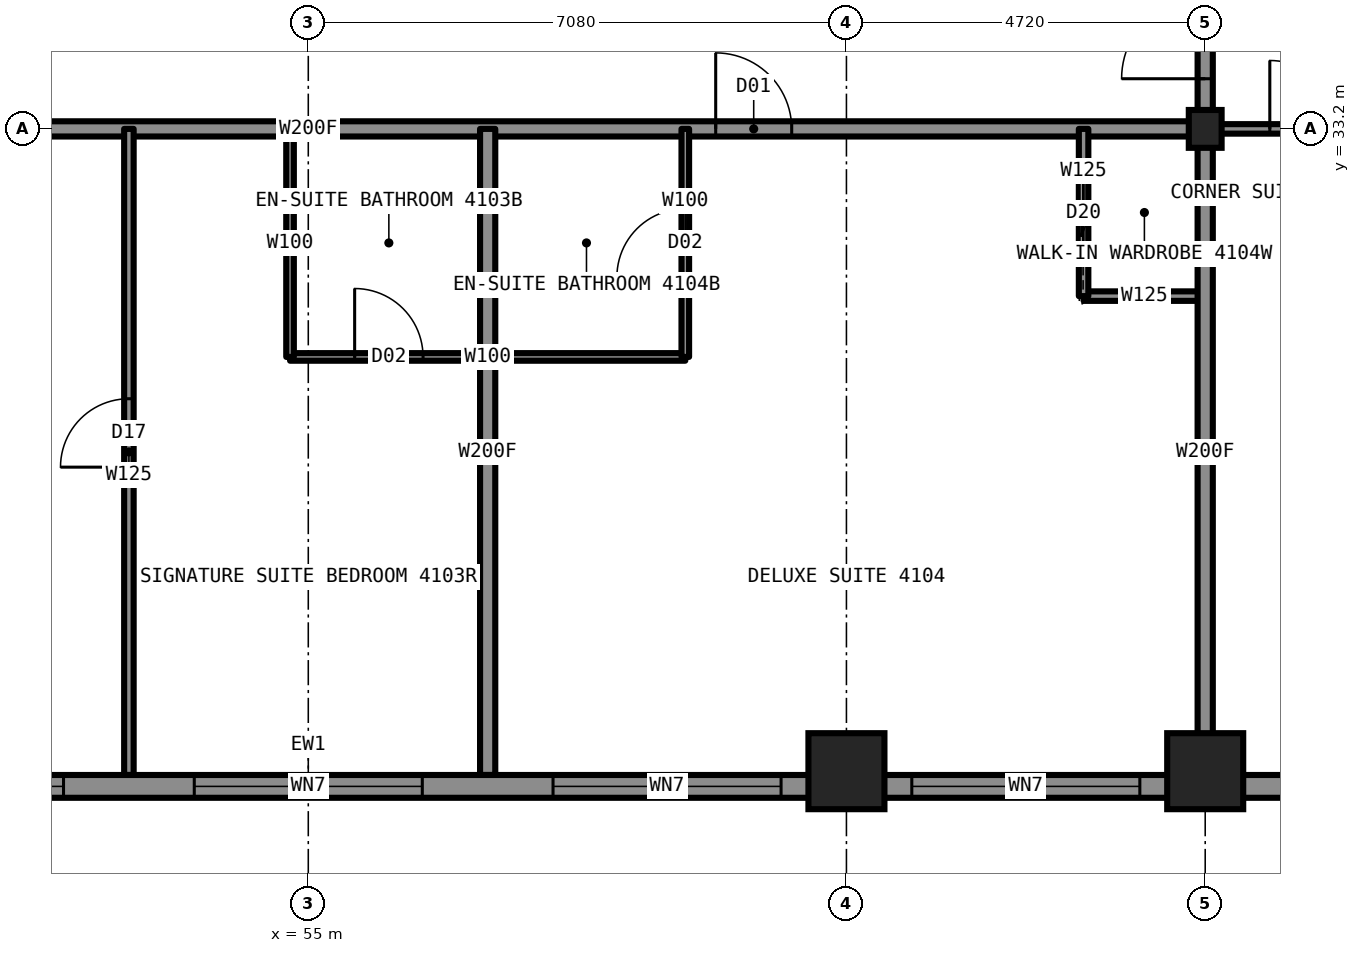
"""IFC4 building model, lengths in metres.
Left out: names, types, materials, properties, quantities, classifications, styles, units other than length and angle.
Written with IfcOpenShell. Run it as: python <this file> out.ifc"""

import sys

from ifc_helpers import new_model, si_unit, direction, frame, frame_2d, origin, origin_2d, place, context, subcontext, project, spatial, rectangle, i_section, extrude, element, fill, save


model = new_model("IFC4")
c1 = context("Model", 3, precision=1e-05, world=origin(), true_north=direction((0.0, 1.0)))
c2 = subcontext(c1, "Body", "Model", "MODEL_VIEW")
j1 = project(units=[si_unit("LENGTHUNIT", "METRE"), si_unit("PLANEANGLEUNIT", "RADIAN")], contexts=[c1])
p1 = place(None, origin())
s1 = spatial("IfcSite", under=j1, at=p1, CompositionType="ELEMENT")
p2 = place(p1, origin())
s2 = spatial("IfcBuilding", under=s1, at=p2, CompositionType="ELEMENT")
p3 = place(p2, frame((0.0, 0.0, 145.9)))
s3 = spatial("IfcBuildingStorey", under=s2, at=p3, CompositionType="ELEMENT", Elevation=145.9)
for number, where, z_axis, x_axis in (
    (1, (62.08, 24.75, 0.0), (0.0, 0.0, 1.0), (1.0, 0.0, 0.0)),
    (2, (66.8, 24.75, 0.0), (0.0, 0.0, 1.0), (1.0, 0.0, 0.0)),
):
    element("IfcColumn", number, at=place(p3, frame(where, z_axis=z_axis, x_axis=x_axis)), inside=s3, PredefinedType="COLUMN", context=c2, shape_type="SweptSolid", body=[
        extrude(i_section(OverallWidth=0.422, OverallDepth=0.465, WebThickness=0.045, FlangeThickness=0.073, at=origin_2d()), origin(), (0.0, 0.0, 1.0), 3.5),
    ])
p4 = place(p3, frame((66.8, 33.2, 0.0), z_axis=(0.0, 0.0, 1.0), x_axis=(1.0, 0.0, 0.0)))
e3 = element("IfcColumn", 3, at=p4, inside=s3, PredefinedType="COLUMN", context=c2, shape_type="SweptSolid", body=[
    extrude(i_section(OverallWidth=0.432, OverallDepth=0.498, WebThickness=0.056, FlangeThickness=0.089, at=origin_2d()), origin(), (0.0, 0.0, 1.0), 3.5),
])
p5 = place(p3, frame((43.2, 33.2, 0.0), z_axis=(0.0, 0.0, 1.0), x_axis=(1.0, 0.0, 0.0)))
e4 = element("IfcWall", 4, at=p5, inside=s3, PredefinedType="PARTITIONING", context=c2, shape_type="SweptSolid", body=[
    extrude(rectangle(XDim=23.6, YDim=0.2, at=frame_2d((11.8, 0.0))), origin(), (0.0, 0.0, 1.0), 3.33),
])
p6 = place(p5, frame((1.85, 0.0, 0.0)))
e5 = element("IfcOpeningElement", 5, at=p6, cuts=e4, PredefinedType="OPENING", context=c2, shape_type="SweptSolid", body=[
    extrude(rectangle(XDim=1.1, YDim=2.2, at=frame_2d((0.55, 1.1))), frame((0.0, 0.11, 0.0), z_axis=(0.0, -1.0, 0.0), x_axis=(1.0, 0.0, 0.0)), (0.0, 0.0, 1.0), 0.22),
])
p7 = place(p5, frame((17.16, 0.0, 0.0)))
e6 = element("IfcOpeningElement", 6, at=p7, cuts=e4, PredefinedType="OPENING", context=c2, shape_type="SweptSolid", body=[
    extrude(rectangle(XDim=1.0, YDim=2.2, at=frame_2d((0.5, 1.1))), frame((0.0, 0.11, 0.0), z_axis=(0.0, -1.0, 0.0), x_axis=(1.0, 0.0, 0.0)), (0.0, 0.0, 1.0), 0.22),
])
p8 = place(p3, frame((66.8, 33.2, 0.0), z_axis=(0.0, 0.0, 1.0), x_axis=(1.0, 0.0, 0.0)))
e7 = element("IfcWall", 7, at=p8, inside=s3, PredefinedType="PARTITIONING", context=c2, shape_type="SweptSolid", body=[
    extrude(rectangle(XDim=8.5, YDim=0.125, at=frame_2d((4.25, 0.0))), origin(), (0.0, 0.0, 1.0), 2.573),
])
p9 = place(p8, frame((0.85, 0.0, 0.0)))
e8 = element("IfcOpeningElement", 8, at=p9, cuts=e7, PredefinedType="OPENING", context=c2, shape_type="SweptSolid", body=[
    extrude(rectangle(XDim=0.9, YDim=2.2, at=frame_2d((0.45, 1.1))), frame((0.0, 0.073, 0.0), z_axis=(0.0, -1.0, 0.0), x_axis=(1.0, 0.0, 0.0)), (0.0, 0.0, 1.0), 0.145),
])
p10 = place(p3, frame((65.2, 31.0, 0.0), z_axis=(0.0, 0.0, 1.0), x_axis=(1.0, 0.0, 0.0)))
e9 = element("IfcWall", 9, at=p10, inside=s3, PredefinedType="PARTITIONING", context=c2, shape_type="SweptSolid", body=[
    extrude(rectangle(XDim=1.6, YDim=0.125, at=frame_2d((0.8, 0.0))), origin(), (0.0, 0.0, 1.0), 3.33),
])
p11 = place(p3, frame((54.76, 30.2, 0.0), z_axis=(0.0, 0.0, 1.0), x_axis=(1.0, 0.0, 0.0)))
e10 = element("IfcWall", 10, at=p11, inside=s3, PredefinedType="PARTITIONING", context=c2, shape_type="SweptSolid", body=[
    extrude(rectangle(XDim=5.2, YDim=0.1, at=frame_2d((2.6, 0.0))), origin(), (0.0, 0.0, 1.0), 3.33),
])
p12 = place(p11, frame((0.85, 0.0, 0.0)))
e11 = element("IfcOpeningElement", 11, at=p12, cuts=e10, PredefinedType="OPENING", context=c2, shape_type="SweptSolid", body=[
    extrude(rectangle(XDim=0.9, YDim=2.1, at=frame_2d((0.45, 1.05))), frame((0.0, 0.06, 0.0), z_axis=(0.0, -1.0, 0.0), x_axis=(1.0, 0.0, 0.0)), (0.0, 0.0, 1.0), 0.12),
])
p13 = place(p3, frame((54.76, 30.2, 0.0), z_axis=(0.0, 0.0, 1.0), x_axis=(0.0, 1.0, 0.0)))
e12 = element("IfcWall", 12, at=p13, inside=s3, PredefinedType="PARTITIONING", context=c2, shape_type="SweptSolid", body=[
    extrude(rectangle(XDim=3.0, YDim=0.1, at=frame_2d((1.5, 0.0))), origin(), (0.0, 0.0, 1.0), 3.33),
])
p14 = place(p3, frame((52.64, 24.7, 0.0), z_axis=(0.0, 0.0, 1.0), x_axis=(0.0, 1.0, 0.0)))
e13 = element("IfcWall", 13, at=p14, inside=s3, PredefinedType="PARTITIONING", context=c2, shape_type="SweptSolid", body=[
    extrude(rectangle(XDim=8.5, YDim=0.125, at=frame_2d((4.25, 0.0))), origin(), (0.0, 0.0, 1.0), 3.33),
])
p15 = place(p14, frame((4.05, 0.0, 0.0)))
e14 = element("IfcOpeningElement", 14, at=p15, cuts=e13, PredefinedType="OPENING", context=c2, shape_type="SweptSolid", body=[
    extrude(rectangle(XDim=0.9, YDim=2.2, at=frame_2d((0.45, 1.1))), frame((0.0, 0.073, 0.0), z_axis=(0.0, -1.0, 0.0), x_axis=(1.0, 0.0, 0.0)), (0.0, 0.0, 1.0), 0.145),
])
p16 = place(p3, frame((65.2, 31.0, 0.0), z_axis=(0.0, 0.0, 1.0), x_axis=(0.0, 1.0, 0.0)))
e15 = element("IfcWall", 15, at=p16, inside=s3, PredefinedType="PARTITIONING", context=c2, shape_type="SweptSolid", body=[
    extrude(rectangle(XDim=2.2, YDim=0.125, at=frame_2d((1.1, 0.0))), origin(), (0.0, 0.0, 1.0), 3.33),
])
p17 = place(p16, frame((0.7, 0.0, 0.0)))
e16 = element("IfcOpeningElement", 16, at=p17, cuts=e15, PredefinedType="OPENING", context=c2, shape_type="SweptSolid", body=[
    extrude(rectangle(XDim=0.8, YDim=2.1, at=frame_2d((0.4, 1.05))), frame((0.0, 0.073, 0.0), z_axis=(0.0, -1.0, 0.0), x_axis=(1.0, 0.0, 0.0)), (0.0, 0.0, 1.0), 0.145),
])
p18 = place(p3, frame((66.8, 33.2, 0.0), z_axis=(0.0, 0.0, 1.0), x_axis=(0.0, 1.0, 0.0)))
e17 = element("IfcWall", 17, at=p18, inside=s3, PredefinedType="PARTITIONING", context=c2, shape_type="SweptSolid", body=[
    extrude(rectangle(XDim=23.6, YDim=0.2, at=frame_2d((11.8, 0.0))), origin(), (0.0, 0.0, 1.0), 3.33),
])
p19 = place(p18, frame((7.87, 0.0, 0.0)))
e18 = element("IfcOpeningElement", 18, at=p19, cuts=e17, PredefinedType="OPENING", context=c2, shape_type="SweptSolid", body=[
    extrude(rectangle(XDim=1.0, YDim=2.2, at=frame_2d((0.5, 1.1))), frame((0.0, 0.11, 0.0), z_axis=(0.0, -1.0, 0.0), x_axis=(1.0, 0.0, 0.0)), (0.0, 0.0, 1.0), 0.22),
])
p20 = place(p18, frame((11.7, 0.0, 0.0)))
e19 = element("IfcOpeningElement", 19, at=p20, cuts=e17, PredefinedType="OPENING", context=c2, shape_type="SweptSolid", body=[
    extrude(rectangle(XDim=1.0, YDim=2.2, at=frame_2d((0.5, 1.1))), frame((0.0, 0.11, 0.0), z_axis=(0.0, -1.0, 0.0), x_axis=(1.0, 0.0, 0.0)), (0.0, 0.0, 1.0), 0.22),
])
p21 = place(p18, frame((14.56, 0.0, 0.0)))
e20 = element("IfcOpeningElement", 20, at=p21, cuts=e17, PredefinedType="OPENING", context=c2, shape_type="SweptSolid", body=[
    extrude(rectangle(XDim=1.0, YDim=2.2, at=frame_2d((0.5, 1.1))), frame((0.0, 0.11, 0.0), z_axis=(0.0, -1.0, 0.0), x_axis=(1.0, 0.0, 0.0)), (0.0, 0.0, 1.0), 0.22),
])
p22 = place(p18, frame((21.84, 0.0, 0.0)))
e21 = element("IfcOpeningElement", 21, at=p22, cuts=e17, PredefinedType="OPENING", context=c2, shape_type="SweptSolid", body=[
    extrude(rectangle(XDim=1.1, YDim=2.2, at=frame_2d((0.55, 1.1))), frame((0.0, 0.11, 0.0), z_axis=(0.0, -1.0, 0.0), x_axis=(1.0, 0.0, 0.0)), (0.0, 0.0, 1.0), 0.22),
])
p23 = place(p18, frame((0.66, 0.0, 0.0)))
e22 = element("IfcOpeningElement", 22, at=p23, cuts=e17, PredefinedType="OPENING", context=c2, shape_type="SweptSolid", body=[
    extrude(rectangle(XDim=1.1, YDim=2.2, at=frame_2d((0.55, 1.1))), frame((0.0, 0.11, 0.0), z_axis=(0.0, -1.0, 0.0), x_axis=(1.0, 0.0, 0.0)), (0.0, 0.0, 1.0), 0.22),
])
p24 = place(p3, frame((66.8, 24.7, 0.0), z_axis=(0.0, 0.0, 1.0), x_axis=(0.0, 1.0, 0.0)))
e23 = element("IfcWall", 23, at=p24, inside=s3, PredefinedType="PARTITIONING", context=c2, shape_type="SweptSolid", body=[
    extrude(rectangle(XDim=8.5, YDim=0.2, at=frame_2d((4.25, 0.0))), origin(), (0.0, 0.0, 1.0), 2.573),
])
p25 = place(p3, frame((57.36, 24.7, 0.0), z_axis=(0.0, 0.0, 1.0), x_axis=(0.0, 1.0, 0.0)))
e24 = element("IfcWall", 24, at=p25, inside=s3, PredefinedType="PARTITIONING", context=c2, shape_type="SweptSolid", body=[
    extrude(rectangle(XDim=8.5, YDim=0.2, at=frame_2d((4.25, 0.0))), origin(), (0.0, 0.0, 1.0), 3.33),
])
p26 = place(p3, frame((59.96, 30.2, 0.0), z_axis=(0.0, 0.0, 1.0), x_axis=(0.0, 1.0, 0.0)))
e25 = element("IfcWall", 25, at=p26, inside=s3, PredefinedType="PARTITIONING", context=c2, shape_type="SweptSolid", body=[
    extrude(rectangle(XDim=3.0, YDim=0.1, at=frame_2d((1.5, 0.0))), origin(), (0.0, 0.0, 1.0), 3.33),
])
p27 = place(p26, frame((1.05, 0.0, 0.0)))
e26 = element("IfcOpeningElement", 26, at=p27, cuts=e25, PredefinedType="OPENING", context=c2, shape_type="SweptSolid", body=[
    extrude(rectangle(XDim=0.9, YDim=2.1, at=frame_2d((0.45, 1.05))), frame((0.0, 0.06, 0.0), z_axis=(0.0, -1.0, 0.0), x_axis=(1.0, 0.0, 0.0)), (0.0, 0.0, 1.0), 0.12),
])
p28 = place(p3, frame((39.9, 24.55, 0.0), z_axis=(0.0, 0.0, 1.0), x_axis=(1.0, 0.0, 0.0)))
e27 = element("IfcWall", 27, at=p28, inside=s3, PredefinedType="SOLIDWALL", context=c2, shape_type="SweptSolid", body=[
    extrude(rectangle(XDim=30.2, YDim=0.3, at=frame_2d((15.1, 0.0))), origin(), (0.0, 0.0, 1.0), 2.83),
])
p29 = place(p28, frame((1.3, 0.0, 0.8)))
e28 = element("IfcOpeningElement", 28, at=p29, cuts=e27, PredefinedType="OPENING", context=c2, shape_type="SweptSolid", body=[
    extrude(rectangle(XDim=1.1, YDim=1.7, at=frame_2d((0.55, 0.85))), frame((0.0, 0.16, 0.0), z_axis=(0.0, -1.0, 0.0), x_axis=(1.0, 0.0, 0.0)), (0.0, 0.0, 1.0), 0.32),
])
p30 = place(p28, frame((4.16, 0.0, 0.5)))
e29 = element("IfcOpeningElement", 29, at=p30, cuts=e27, PredefinedType="OPENING", context=c2, shape_type="SweptSolid", body=[
    extrude(rectangle(XDim=3.0, YDim=2.0, at=frame_2d((1.5, 1.0))), frame((0.0, 0.16, 0.0), z_axis=(0.0, -1.0, 0.0), x_axis=(1.0, 0.0, 0.0)), (0.0, 0.0, 1.0), 0.32),
])
p31 = place(p28, frame((8.88, 0.0, 0.5)))
e30 = element("IfcOpeningElement", 30, at=p31, cuts=e27, PredefinedType="OPENING", context=c2, shape_type="SweptSolid", body=[
    extrude(rectangle(XDim=3.0, YDim=2.0, at=frame_2d((1.5, 1.0))), frame((0.0, 0.16, 0.0), z_axis=(0.0, -1.0, 0.0), x_axis=(1.0, 0.0, 0.0)), (0.0, 0.0, 1.0), 0.32),
])
p32 = place(p28, frame((13.6, 0.0, 0.5)))
e31 = element("IfcOpeningElement", 31, at=p32, cuts=e27, PredefinedType="OPENING", context=c2, shape_type="SweptSolid", body=[
    extrude(rectangle(XDim=3.0, YDim=2.0, at=frame_2d((1.5, 1.0))), frame((0.0, 0.16, 0.0), z_axis=(0.0, -1.0, 0.0), x_axis=(1.0, 0.0, 0.0)), (0.0, 0.0, 1.0), 0.32),
])
p33 = place(p28, frame((18.32, 0.0, 0.5)))
e32 = element("IfcOpeningElement", 32, at=p33, cuts=e27, PredefinedType="OPENING", context=c2, shape_type="SweptSolid", body=[
    extrude(rectangle(XDim=3.0, YDim=2.0, at=frame_2d((1.5, 1.0))), frame((0.0, 0.16, 0.0), z_axis=(0.0, -1.0, 0.0), x_axis=(1.0, 0.0, 0.0)), (0.0, 0.0, 1.0), 0.32),
])
p34 = place(p28, frame((23.04, 0.0, 0.5)))
e33 = element("IfcOpeningElement", 33, at=p34, cuts=e27, PredefinedType="OPENING", context=c2, shape_type="SweptSolid", body=[
    extrude(rectangle(XDim=3.0, YDim=2.0, at=frame_2d((1.5, 1.0))), frame((0.0, 0.16, 0.0), z_axis=(0.0, -1.0, 0.0), x_axis=(1.0, 0.0, 0.0)), (0.0, 0.0, 1.0), 0.32),
])
p35 = place(p28, frame((27.75, 0.0, 0.8)))
e34 = element("IfcOpeningElement", 34, at=p35, cuts=e27, PredefinedType="OPENING", context=c2, shape_type="SweptSolid", body=[
    extrude(rectangle(XDim=1.1, YDim=1.7, at=frame_2d((0.55, 0.85))), frame((0.0, 0.16, 0.0), z_axis=(0.0, -1.0, 0.0), x_axis=(1.0, 0.0, 0.0)), (0.0, 0.0, 1.0), 0.32),
])
p36 = place(p12, origin())
e35 = element("IfcDoor", 35, at=p36, inside=s3, OperationType="SINGLE_SWING_RIGHT", PredefinedType="DOOR", context=c2, shape_type="SweptSolid", body=[
    extrude(rectangle(XDim=0.9, YDim=2.1, at=frame_2d((0.45, 1.05))), frame((0.0, 0.025, 0.0), z_axis=(0.0, -1.0, 0.0), x_axis=(1.0, 0.0, 0.0)), (0.0, 0.0, 1.0), 0.05),
])
fill(e11, e35)
p37 = place(p15, origin())
e36 = element("IfcDoor", 36, at=p37, inside=s3, OperationType="SINGLE_SWING_LEFT", PredefinedType="DOOR", context=c2, shape_type="SweptSolid", body=[
    extrude(rectangle(XDim=0.9, YDim=2.2, at=frame_2d((0.45, 1.1))), frame((0.0, 0.025, 0.0), z_axis=(0.0, -1.0, 0.0), x_axis=(1.0, 0.0, 0.0)), (0.0, 0.0, 1.0), 0.05),
])
fill(e14, e36)
p38 = place(p7, origin())
e37 = element("IfcDoor", 37, at=p38, inside=s3, OperationType="SINGLE_SWING_LEFT", PredefinedType="DOOR", context=c2, shape_type="SweptSolid", body=[
    extrude(rectangle(XDim=1.0, YDim=2.2, at=frame_2d((0.5, 1.1))), frame((0.0, 0.025, 0.0), z_axis=(0.0, -1.0, 0.0), x_axis=(1.0, 0.0, 0.0)), (0.0, 0.0, 1.0), 0.05),
])
fill(e6, e37)
p39 = place(p27, origin())
e38 = element("IfcDoor", 38, at=p39, inside=s3, OperationType="SINGLE_SWING_RIGHT", PredefinedType="DOOR", context=c2, shape_type="SweptSolid", body=[
    extrude(rectangle(XDim=0.9, YDim=2.1, at=frame_2d((0.45, 1.05))), frame((0.0, 0.025, 0.0), z_axis=(0.0, -1.0, 0.0), x_axis=(1.0, 0.0, 0.0)), (0.0, 0.0, 1.0), 0.05),
])
fill(e26, e38)
p40 = place(p17, origin())
e39 = element("IfcDoor", 39, at=p40, inside=s3, OperationType="SLIDING_TO_LEFT", PredefinedType="DOOR", context=c2, shape_type="SweptSolid", body=[
    extrude(rectangle(XDim=0.8, YDim=2.1, at=frame_2d((0.4, 1.05))), frame((0.0, 0.025, 0.0), z_axis=(0.0, -1.0, 0.0), x_axis=(1.0, 0.0, 0.0)), (0.0, 0.0, 1.0), 0.05),
])
fill(e16, e39)
p41 = place(p9, origin())
e40 = element("IfcDoor", 40, at=p41, inside=s3, OperationType="SINGLE_SWING_LEFT", PredefinedType="DOOR", context=c2, shape_type="SweptSolid", body=[
    extrude(rectangle(XDim=0.9, YDim=2.2, at=frame_2d((0.45, 1.1))), frame((0.0, 0.025, 0.0), z_axis=(0.0, -1.0, 0.0), x_axis=(1.0, 0.0, 0.0)), (0.0, 0.0, 1.0), 0.05),
])
fill(e8, e40)
p42 = place(p23, origin())
e41 = element("IfcDoor", 41, at=p42, inside=s3, OperationType="SINGLE_SWING_LEFT", PredefinedType="DOOR", context=c2, shape_type="SweptSolid", body=[
    extrude(rectangle(XDim=1.1, YDim=2.2, at=frame_2d((0.55, 1.1))), frame((0.0, 0.025, 0.0), z_axis=(0.0, -1.0, 0.0), x_axis=(1.0, 0.0, 0.0)), (0.0, 0.0, 1.0), 0.05),
])
fill(e22, e41)
p43 = place(p31, origin())
e42 = element("IfcWindow", 42, at=p43, inside=s3, PartitioningType="SINGLE_PANEL", PredefinedType="WINDOW", context=c2, shape_type="SweptSolid", body=[
    extrude(rectangle(XDim=3.0, YDim=2.0, at=frame_2d((1.5, 1.0))), frame((0.0, 0.03, 0.0), z_axis=(0.0, -1.0, 0.0), x_axis=(1.0, 0.0, 0.0)), (0.0, 0.0, 1.0), 0.06),
])
fill(e30, e42)
p44 = place(p32, origin())
e43 = element("IfcWindow", 43, at=p44, inside=s3, PartitioningType="SINGLE_PANEL", PredefinedType="WINDOW", context=c2, shape_type="SweptSolid", body=[
    extrude(rectangle(XDim=3.0, YDim=2.0, at=frame_2d((1.5, 1.0))), frame((0.0, 0.03, 0.0), z_axis=(0.0, -1.0, 0.0), x_axis=(1.0, 0.0, 0.0)), (0.0, 0.0, 1.0), 0.06),
])
fill(e31, e43)
p45 = place(p33, origin())
e44 = element("IfcWindow", 44, at=p45, inside=s3, PartitioningType="SINGLE_PANEL", PredefinedType="WINDOW", context=c2, shape_type="SweptSolid", body=[
    extrude(rectangle(XDim=3.0, YDim=2.0, at=frame_2d((1.5, 1.0))), frame((0.0, 0.03, 0.0), z_axis=(0.0, -1.0, 0.0), x_axis=(1.0, 0.0, 0.0)), (0.0, 0.0, 1.0), 0.06),
])
fill(e32, e44)
p46 = place(p34, origin())
e45 = element("IfcWindow", 45, at=p46, inside=s3, PartitioningType="SINGLE_PANEL", PredefinedType="WINDOW", context=c2, shape_type="SweptSolid", body=[
    extrude(rectangle(XDim=3.0, YDim=2.0, at=frame_2d((1.5, 1.0))), frame((0.0, 0.03, 0.0), z_axis=(0.0, -1.0, 0.0), x_axis=(1.0, 0.0, 0.0)), (0.0, 0.0, 1.0), 0.06),
])
fill(e33, e45)
p47 = place(p35, origin())
e46 = element("IfcWindow", 46, at=p47, inside=s3, PartitioningType="SINGLE_PANEL", PredefinedType="WINDOW", context=c2, shape_type="SweptSolid", body=[
    extrude(rectangle(XDim=1.1, YDim=1.7, at=frame_2d((0.55, 0.85))), frame((0.0, 0.03, 0.0), z_axis=(0.0, -1.0, 0.0), x_axis=(1.0, 0.0, 0.0)), (0.0, 0.0, 1.0), 0.06),
])
fill(e34, e46)
save(model, sys.argv[1])
